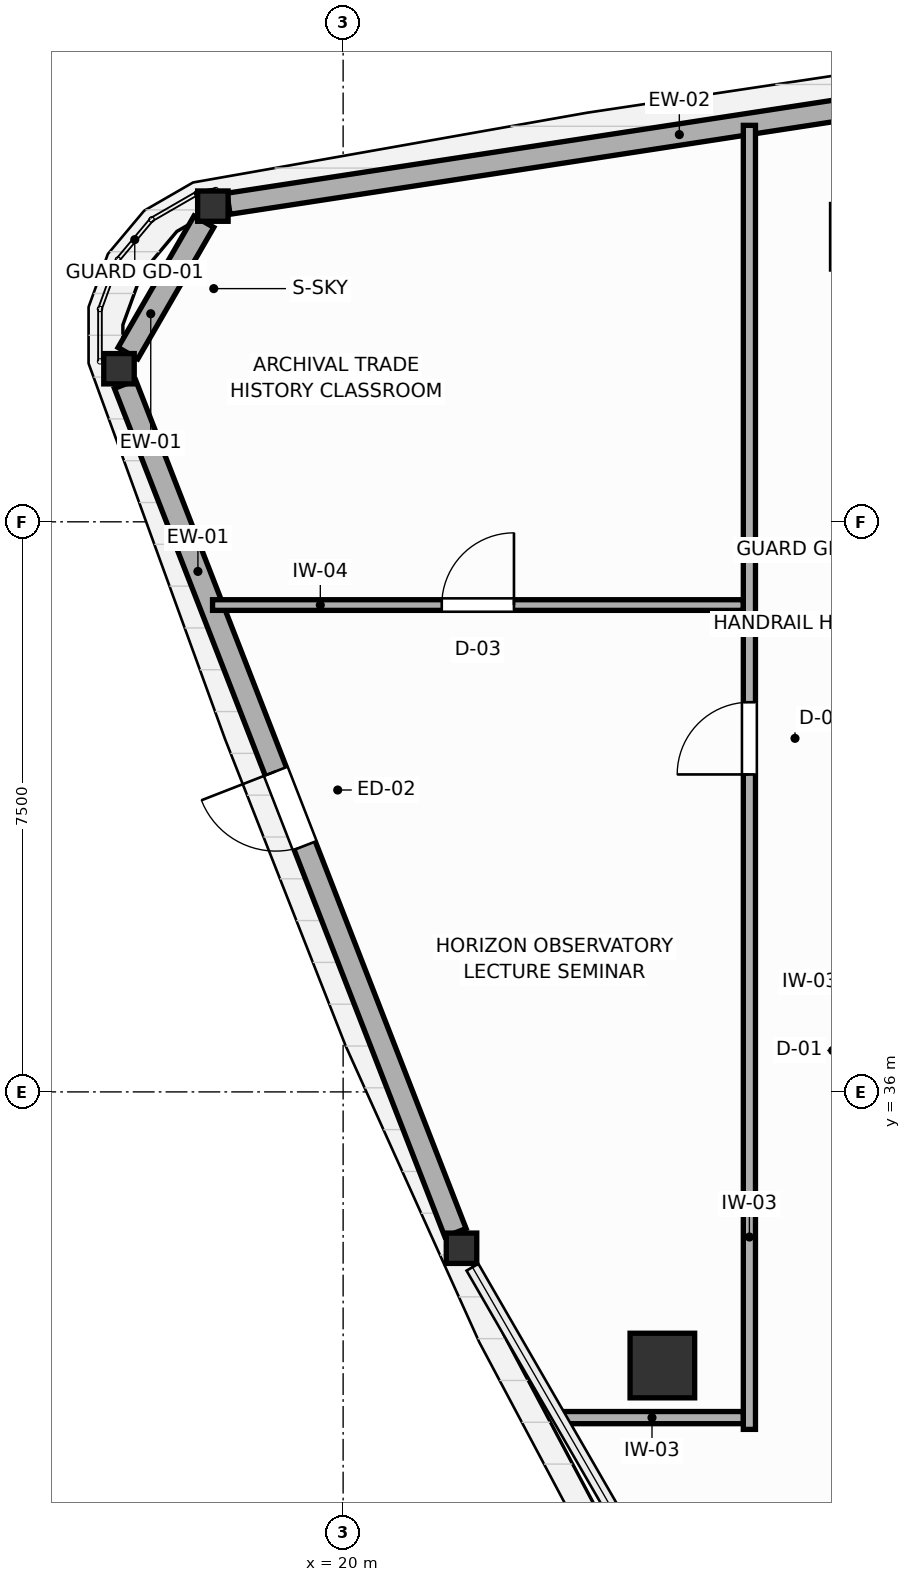
"""IFC4 building model, lengths in metres.
Left out: names, types, materials, properties, quantities, classifications, styles, units other than length and angle.
Written with IfcOpenShell. Run it as: python <this file> out.ifc"""

import sys

from ifc_helpers import new_model, si_unit, direction, frame, frame_2d, origin, origin_2d, place, context, subcontext, project, spatial, rectangle, i_section, extrude, source, transform, mapped, element, fill, save


model = new_model("IFC4")
c1 = context("Model", 3, precision=1e-05, world=origin(), true_north=direction((0.0, 1.0)))
c2 = subcontext(c1, "Body", "Model", "MODEL_VIEW")
j1 = project(units=[si_unit("LENGTHUNIT", "METRE"), si_unit("PLANEANGLEUNIT", "RADIAN")], contexts=[c1])
p1 = place(None, origin())
s1 = spatial("IfcSite", under=j1, at=p1, CompositionType="ELEMENT")
p2 = place(p1, origin())
s2 = spatial("IfcBuilding", under=s1, at=p2, CompositionType="ELEMENT")
p3 = place(p2, frame((0.0, 0.0, 283.8)))
s3 = spatial("IfcBuildingStorey", under=s2, at=p3, CompositionType="ELEMENT", Elevation=283.8)
m1 = source(origin(), c2, "Body", "SweptSolid", [
    extrude(rectangle(XDim=0.85, YDim=0.85, at=origin_2d()), origin(), (0.0, 0.0, 1.0), 4.2),
])
for number, where, z_axis, x_axis in (
    (1, (26.85, 47.25, 0.0), (0.0, 0.0, 1.0), (1.0, 0.0, 0.0)),
    (2, (24.2, 32.4, 0.0), (0.0, 0.0, 1.0), (1.0, 0.0, 0.0)),
):
    element("IfcColumn", number, at=place(p3, frame(where, z_axis=z_axis, x_axis=x_axis)), inside=s3, PredefinedType="COLUMN", context=c2, shape_type="MappedRepresentation", body=[
        mapped(m1, transform((0.0, 0.0, 0.0), scale=1.0)),
    ])
m2 = source(origin(), c2, "Body", "SweptSolid", [
    extrude(i_section(OverallWidth=0.401, OverallDepth=0.399, WebThickness=0.022, FlangeThickness=0.036, FilletRadius=0.015, at=origin_2d()), origin(), (0.0, 0.0, 1.0), 4.2),
])
for number, where, z_axis, x_axis in (
    (3, (18.286, 47.653, 0.0), (0.0, 0.0, 1.0), (1.0, 0.0, 0.0)),
    (4, (17.051, 45.514, 0.0), (0.0, 0.0, 1.0), (1.0, 0.0, 0.0)),
    (5, (21.558, 33.943, 0.0), (0.0, 0.0, 1.0), (1.0, 0.0, 0.0)),
):
    element("IfcColumn", number, at=place(p3, frame(where, z_axis=z_axis, x_axis=x_axis)), inside=s3, PredefinedType="COLUMN", context=c2, shape_type="MappedRepresentation", body=[
        mapped(m2, transform((0.0, 0.0, 0.0), scale=1.0)),
    ])
p4 = place(p3, frame((30.354, 49.504, 0.0), z_axis=(0.0, 0.0, 1.0), x_axis=(-0.988436984166, -0.151632214035, 0.0)))
e6 = element("IfcWall", 6, at=p4, inside=s3, PredefinedType="SOLIDWALL", context=c2, shape_type="SweptSolid", body=[
    extrude(rectangle(XDim=12.001, YDim=0.28, at=frame_2d((6.001, 0.0))), origin(), (0.0, 0.0, 1.0), 2.52),
])
p5 = place(p3, frame((18.168, 47.448, 0.0), z_axis=(0.0, 0.0, 1.0), x_axis=(-0.499990466345, -0.866030907973, 0.0)))
e7 = element("IfcWall", 7, at=p5, inside=s3, PredefinedType="SOLIDWALL", context=c2, shape_type="SweptSolid", body=[
    extrude(rectangle(XDim=1.998, YDim=0.3, at=frame_2d((0.999, 0.0))), origin(), (0.0, 0.0, 1.0), 2.52),
])
p6 = place(p3, frame((17.131, 45.31, 0.0), z_axis=(0.0, 0.0, 1.0), x_axis=(0.362913406034, -0.931822869284, 0.0)))
e8 = element("IfcWall", 8, at=p6, inside=s3, PredefinedType="SOLIDWALL", context=c2, shape_type="SweptSolid", body=[
    extrude(rectangle(XDim=11.979, YDim=0.3, at=frame_2d((5.989, 0.0))), origin(), (0.0, 0.0, 1.0), 2.52),
])
p7 = place(p6, frame((5.464, 0.0, 0.0)))
e9 = element("IfcOpeningElement", 9, at=p7, cuts=e8, PredefinedType="OPENING", context=c2, shape_type="SweptSolid", body=[
    extrude(rectangle(XDim=1.05, YDim=2.1, at=frame_2d((0.525, 1.05))), frame((0.0, 0.16, 0.0), z_axis=(0.0, -1.0, 0.0), x_axis=(1.0, 0.0, 0.0)), (0.0, 0.0, 1.0), 0.32),
])
p8 = place(p3, frame((25.345, 31.56, 0.0), z_axis=(0.0, 0.0, 1.0), x_axis=(0.0, 1.0, 0.0)))
e10 = element("IfcWall", 10, at=p8, inside=s3, PredefinedType="PARTITIONING", context=c2, shape_type="SweptSolid", body=[
    extrude(rectangle(XDim=17.156, YDim=0.16, at=frame_2d((8.578, 0.0))), origin(), (0.0, 0.0, 1.0), 3.96),
])
p9 = place(p8, frame((8.616, 0.0, 0.0)))
e11 = element("IfcOpeningElement", 11, at=p9, cuts=e10, PredefinedType="OPENING", context=c2, shape_type="SweptSolid", body=[
    extrude(rectangle(XDim=0.95, YDim=2.05, at=frame_2d((0.475, 1.025))), frame((0.0, 0.09, 0.0), z_axis=(0.0, -1.0, 0.0), x_axis=(1.0, 0.0, 0.0)), (0.0, 0.0, 1.0), 0.18),
])
p10 = place(p3, frame((22.864, 31.715, 0.0), z_axis=(0.0, 0.0, 1.0), x_axis=(1.0, 0.0, 0.0)))
e12 = element("IfcWall", 12, at=p10, inside=s3, PredefinedType="PARTITIONING", context=c2, shape_type="SweptSolid", body=[
    extrude(rectangle(XDim=2.399, YDim=0.16, at=frame_2d((1.199, 0.0))), origin(), (0.0, 0.0, 1.0), 3.96),
])
p11 = place(p3, frame((18.282, 42.405, 0.0), z_axis=(0.0, 0.0, 1.0), x_axis=(1.0, 0.0, 0.0)))
e13 = element("IfcWall", 13, at=p11, inside=s3, PredefinedType="PARTITIONING", context=c2, shape_type="SweptSolid", body=[
    extrude(rectangle(XDim=6.981, YDim=0.14, at=frame_2d((3.49, 0.0))), origin(), (0.0, 0.0, 1.0), 3.96),
])
p12 = place(p11, frame((3.015, 0.0, 0.0)))
e14 = element("IfcOpeningElement", 14, at=p12, cuts=e13, PredefinedType="OPENING", context=c2, shape_type="SweptSolid", body=[
    extrude(rectangle(XDim=0.95, YDim=2.05, at=frame_2d((0.475, 1.025))), frame((0.0, 0.08, 0.0), z_axis=(0.0, -1.0, 0.0), x_axis=(1.0, 0.0, 0.0)), (0.0, 0.0, 1.0), 0.16),
])
p13 = place(p7, frame((1.05, 0.0, 0.0), z_axis=(0.0, 0.0, 1.0), x_axis=(-1.0, 0.0, 0.0)))
e15 = element("IfcDoor", 15, at=p13, inside=s3, OperationType="SINGLE_SWING_RIGHT", PredefinedType="DOOR", context=c2, shape_type="SweptSolid", body=[
    extrude(rectangle(XDim=1.05, YDim=2.1, at=frame_2d((0.525, 1.05))), frame((0.0, 0.025, 0.0), z_axis=(0.0, -1.0, 0.0), x_axis=(1.0, 0.0, 0.0)), (0.0, 0.0, 1.0), 0.05),
])
fill(e9, e15)
p14 = place(p9, origin())
e16 = element("IfcDoor", 16, at=p14, inside=s3, OperationType="SINGLE_SWING_LEFT", PredefinedType="DOOR", context=c2, shape_type="SweptSolid", body=[
    extrude(rectangle(XDim=0.95, YDim=2.05, at=frame_2d((0.475, 1.025))), frame((0.0, 0.025, 0.0), z_axis=(0.0, -1.0, 0.0), x_axis=(1.0, 0.0, 0.0)), (0.0, 0.0, 1.0), 0.05),
])
fill(e11, e16)
p15 = place(p12, origin())
e17 = element("IfcDoor", 17, at=p15, inside=s3, OperationType="SINGLE_SWING_RIGHT", PredefinedType="DOOR", context=c2, shape_type="SweptSolid", body=[
    extrude(rectangle(XDim=0.95, YDim=2.05, at=frame_2d((0.475, 1.025))), frame((0.0, 0.025, 0.0), z_axis=(0.0, -1.0, 0.0), x_axis=(1.0, 0.0, 0.0)), (0.0, 0.0, 1.0), 0.05),
])
fill(e14, e17)
save(model, sys.argv[1])
